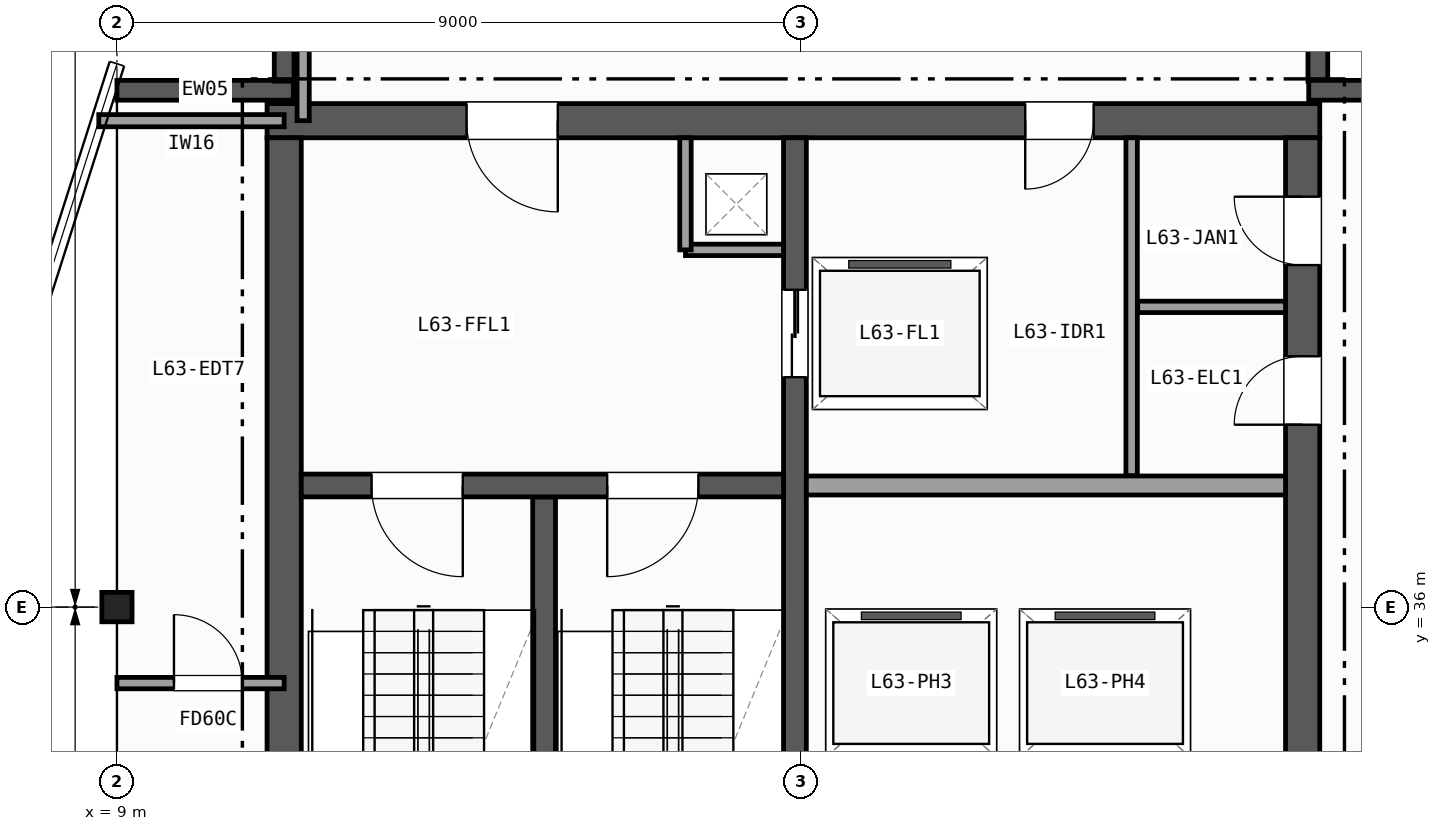
"""IFC4 building model, lengths in metres.
Left out: names, types, materials, properties, quantities, classifications, styles, units other than length and angle.
Written with IfcOpenShell. Run it as: python <this file> out.ifc"""

import sys

from ifc_helpers import new_model, si_unit, direction, frame, frame_2d, origin, origin_2d, place, context, subcontext, project, spatial, rectangle, i_section, extrude, element, fill, save


model = new_model("IFC4")
c1 = context("Model", 3, precision=1e-05, world=origin(), true_north=direction((0.0, 1.0)))
c2 = subcontext(c1, "Body", "Model", "MODEL_VIEW")
j1 = project(units=[si_unit("LENGTHUNIT", "METRE"), si_unit("PLANEANGLEUNIT", "RADIAN")], contexts=[c1])
p1 = place(None, origin())
s1 = spatial("IfcSite", under=j1, at=p1, CompositionType="ELEMENT")
p2 = place(p1, origin())
s2 = spatial("IfcBuilding", under=s1, at=p2, CompositionType="ELEMENT")
p3 = place(p2, frame((0.0, 0.0, 251.9)))
s3 = spatial("IfcBuildingStorey", under=s2, at=p3, CompositionType="ELEMENT", Elevation=251.9)
p4 = place(p3, frame((9.0, 36.0, 0.0), z_axis=(0.0, 0.0, 1.0), x_axis=(1.0, 0.0, 0.0)))
e1 = element("IfcColumn", 1, at=p4, inside=s3, PredefinedType="COLUMN", context=c2, shape_type="SweptSolid", body=[
    extrude(i_section(OverallWidth=0.397, OverallDepth=0.387, WebThickness=0.021, FlangeThickness=0.033, FilletRadius=0.015, at=origin_2d()), origin(), (0.0, 0.0, 1.0), 3.7),
])
p5 = place(p3, frame((9.0, 42.8, 0.0), z_axis=(0.0, 0.0, 1.0), x_axis=(1.0, 0.0, 0.0)))
e2 = element("IfcWall", 2, at=p5, inside=s3, PredefinedType="SOLIDWALL", context=c2, shape_type="SweptSolid", body=[
    extrude(rectangle(XDim=2.32, YDim=0.26, at=frame_2d((1.16, 0.0))), origin(), (0.0, 0.0, 1.0), 3.42),
])
for number, where, z_axis, x_axis in (
    (3, (11.2, 42.92, 0.0), (0.0, 0.0, 1.0), (0.0, 1.0, 0.0)),
    (4, (24.8, 45.0, 0.0), (0.0, 0.0, 1.0), (0.0, -1.0, 0.0)),
):
    element("IfcWall", number, at=place(p3, frame(where, z_axis=z_axis, x_axis=x_axis)), inside=s3, PredefinedType="SOLIDWALL", context=c2, shape_type="SweptSolid", body=[
        extrude(rectangle(XDim=2.08, YDim=0.26, at=frame_2d((1.04, 0.0))), origin(), (0.0, 0.0, 1.0), 3.42),
    ])
p6 = place(p3, frame((24.68, 42.8, 0.0), z_axis=(0.0, 0.0, 1.0), x_axis=(1.0, 0.0, 0.0)))
e5 = element("IfcWall", 5, at=p6, inside=s3, PredefinedType="SOLIDWALL", context=c2, shape_type="SweptSolid", body=[
    extrude(rectangle(XDim=2.32, YDim=0.26, at=frame_2d((1.16, 0.0))), origin(), (0.0, 0.0, 1.0), 3.42),
])
p7 = place(p3, frame((24.825, 42.4, 0.0), z_axis=(0.0, 0.0, 1.0), x_axis=(-1.0, 0.0, 0.0)))
e6 = element("IfcWall", 6, at=p7, inside=s3, PredefinedType="SHEAR", context=c2, shape_type="SweptSolid", body=[
    extrude(rectangle(XDim=13.85, YDim=0.45, at=frame_2d((6.925, 0.0))), origin(), (0.0, 0.0, 1.0), 3.42),
])
p8 = place(p7, frame((10.025, 0.0, 0.0)))
e7 = element("IfcOpeningElement", 7, at=p8, cuts=e6, PredefinedType="OPENING", context=c2, shape_type="SweptSolid", body=[
    extrude(rectangle(XDim=1.2, YDim=2.15, at=frame_2d((0.6, 1.075))), frame((0.0, 0.235, 0.0), z_axis=(0.0, -1.0, 0.0), x_axis=(1.0, 0.0, 0.0)), (0.0, 0.0, 1.0), 0.47),
])
p9 = place(p7, frame((2.975, 0.0, 0.0)))
e8 = element("IfcOpeningElement", 8, at=p9, cuts=e6, PredefinedType="OPENING", context=c2, shape_type="SweptSolid", body=[
    extrude(rectangle(XDim=0.9, YDim=2.1, at=frame_2d((0.45, 1.05))), frame((0.0, 0.235, 0.0), z_axis=(0.0, -1.0, 0.0), x_axis=(1.0, 0.0, 0.0)), (0.0, 0.0, 1.0), 0.47),
])
p10 = place(p3, frame((11.2, 42.175, 0.0), z_axis=(0.0, 0.0, 1.0), x_axis=(0.0, -1.0, 0.0)))
e9 = element("IfcWall", 9, at=p10, inside=s3, PredefinedType="SHEAR", context=c2, shape_type="SweptSolid", body=[
    extrude(rectangle(XDim=13.75, YDim=0.45, at=frame_2d((6.875, 0.0))), origin(), (0.0, 0.0, 1.0), 3.42),
])
p11 = place(p3, frame((24.6, 28.425, 0.0), z_axis=(0.0, 0.0, 1.0), x_axis=(0.0, 1.0, 0.0)))
e10 = element("IfcWall", 10, at=p11, inside=s3, PredefinedType="SHEAR", context=c2, shape_type="SweptSolid", body=[
    extrude(rectangle(XDim=13.75, YDim=0.45, at=frame_2d((6.875, 0.0))), origin(), (0.0, 0.0, 1.0), 3.42),
])
p12 = place(p11, frame((3.375, 0.0, 0.0)))
e11 = element("IfcOpeningElement", 11, at=p12, cuts=e10, PredefinedType="OPENING", context=c2, shape_type="SweptSolid", body=[
    extrude(rectangle(XDim=1.5, YDim=2.2, at=frame_2d((0.75, 1.1))), frame((0.0, 0.235, 0.0), z_axis=(0.0, -1.0, 0.0), x_axis=(1.0, 0.0, 0.0)), (0.0, 0.0, 1.0), 0.47),
])
p13 = place(p11, frame((9.975, 0.0, 0.0)))
e12 = element("IfcOpeningElement", 12, at=p13, cuts=e10, PredefinedType="OPENING", context=c2, shape_type="SweptSolid", body=[
    extrude(rectangle(XDim=0.9, YDim=2.1, at=frame_2d((0.45, 1.05))), frame((0.0, 0.235, 0.0), z_axis=(0.0, -1.0, 0.0), x_axis=(1.0, 0.0, 0.0)), (0.0, 0.0, 1.0), 0.47),
])
p14 = place(p11, frame((12.075, 0.0, 0.0)))
e13 = element("IfcOpeningElement", 13, at=p14, cuts=e10, PredefinedType="OPENING", context=c2, shape_type="SweptSolid", body=[
    extrude(rectangle(XDim=0.9, YDim=2.1, at=frame_2d((0.45, 1.05))), frame((0.0, 0.235, 0.0), z_axis=(0.0, -1.0, 0.0), x_axis=(1.0, 0.0, 0.0)), (0.0, 0.0, 1.0), 0.47),
])
p15 = place(p3, frame((14.62, 28.425, 0.0), z_axis=(0.0, 0.0, 1.0), x_axis=(0.0, 1.0, 0.0)))
e14 = element("IfcWall", 14, at=p15, inside=s3, PredefinedType="SHEAR", context=c2, shape_type="SweptSolid", body=[
    extrude(rectangle(XDim=9.025, YDim=0.3, at=frame_2d((4.512, 0.0))), origin(), (0.0, 0.0, 1.0), 3.42),
])
p16 = place(p3, frame((17.92, 42.175, 0.0), z_axis=(0.0, 0.0, 1.0), x_axis=(0.0, -1.0, 0.0)))
e15 = element("IfcWall", 15, at=p16, inside=s3, PredefinedType="SHEAR", context=c2, shape_type="SweptSolid", body=[
    extrude(rectangle(XDim=13.75, YDim=0.3, at=frame_2d((6.875, 0.0))), origin(), (0.0, 0.0, 1.0), 3.42),
])
p17 = place(p16, frame((2.0, 0.0, 0.0)))
e16 = element("IfcOpeningElement", 16, at=p17, cuts=e15, PredefinedType="OPENING", context=c2, shape_type="SweptSolid", body=[
    extrude(rectangle(XDim=1.15, YDim=2.15, at=frame_2d((0.575, 1.075))), frame((0.0, 0.16, 0.0), z_axis=(0.0, -1.0, 0.0), x_axis=(1.0, 0.0, 0.0)), (0.0, 0.0, 1.0), 0.32),
])
p18 = place(p3, frame((17.77, 37.6, 0.0), z_axis=(0.0, 0.0, 1.0), x_axis=(-1.0, 0.0, 0.0)))
e17 = element("IfcWall", 17, at=p18, inside=s3, PredefinedType="SHEAR", context=c2, shape_type="SweptSolid", body=[
    extrude(rectangle(XDim=6.345, YDim=0.3, at=frame_2d((3.172, 0.0))), origin(), (0.0, 0.0, 1.0), 3.42),
])
p19 = place(p18, frame((4.22, 0.0, 0.0)))
e18 = element("IfcOpeningElement", 18, at=p19, cuts=e17, PredefinedType="OPENING", context=c2, shape_type="SweptSolid", body=[
    extrude(rectangle(XDim=1.2, YDim=2.15, at=frame_2d((0.6, 1.075))), frame((0.0, 0.16, 0.0), z_axis=(0.0, -1.0, 0.0), x_axis=(1.0, 0.0, 0.0)), (0.0, 0.0, 1.0), 0.32),
])
p20 = place(p18, frame((1.12, 0.0, 0.0)))
e19 = element("IfcOpeningElement", 19, at=p20, cuts=e17, PredefinedType="OPENING", context=c2, shape_type="SweptSolid", body=[
    extrude(rectangle(XDim=1.2, YDim=2.15, at=frame_2d((0.6, 1.075))), frame((0.0, 0.16, 0.0), z_axis=(0.0, -1.0, 0.0), x_axis=(1.0, 0.0, 0.0)), (0.0, 0.0, 1.0), 0.32),
])
p21 = place(p3, frame((16.48, 40.7, 0.0), z_axis=(0.0, 0.0, 1.0), x_axis=(1.0, 0.0, 0.0)))
e20 = element("IfcWall", 20, at=p21, inside=s3, PredefinedType="PARTITIONING", context=c2, shape_type="SweptSolid", body=[
    extrude(rectangle(XDim=1.29, YDim=0.15, at=frame_2d((0.645, 0.0))), origin(), (0.0, 0.0, 1.0), 3.42),
])
p22 = place(p3, frame((16.48, 40.7, 0.0), z_axis=(0.0, 0.0, 1.0), x_axis=(0.0, 1.0, 0.0)))
e21 = element("IfcWall", 21, at=p22, inside=s3, PredefinedType="PARTITIONING", context=c2, shape_type="SweptSolid", body=[
    extrude(rectangle(XDim=1.475, YDim=0.15, at=frame_2d((0.738, 0.0))), origin(), (0.0, 0.0, 1.0), 3.42),
])
p23 = place(p3, frame((18.07, 37.6, 0.0), z_axis=(0.0, 0.0, 1.0), x_axis=(1.0, 0.0, 0.0)))
e22 = element("IfcWall", 22, at=p23, inside=s3, PredefinedType="PARTITIONING", context=c2, shape_type="SweptSolid", body=[
    extrude(rectangle(XDim=6.305, YDim=0.25, at=frame_2d((3.152, 0.0))), origin(), (0.0, 0.0, 1.0), 3.42),
])
p24 = place(p3, frame((22.35, 37.73, 0.0), z_axis=(0.0, 0.0, 1.0), x_axis=(0.0, 1.0, 0.0)))
e23 = element("IfcWall", 23, at=p24, inside=s3, PredefinedType="PARTITIONING", context=c2, shape_type="SweptSolid", body=[
    extrude(rectangle(XDim=4.445, YDim=0.15, at=frame_2d((2.223, 0.0))), origin(), (0.0, 0.0, 1.0), 3.42),
])
p25 = place(p3, frame((22.43, 39.95, 0.0), z_axis=(0.0, 0.0, 1.0), x_axis=(1.0, 0.0, 0.0)))
e24 = element("IfcWall", 24, at=p25, inside=s3, PredefinedType="PARTITIONING", context=c2, shape_type="SweptSolid", body=[
    extrude(rectangle(XDim=1.945, YDim=0.15, at=frame_2d((0.973, 0.0))), origin(), (0.0, 0.0, 1.0), 3.42),
])
p26 = place(p3, frame((8.761, 42.4, 0.0), z_axis=(0.0, 0.0, 1.0), x_axis=(1.0, 0.0, 0.0)))
e25 = element("IfcWall", 25, at=p26, inside=s3, PredefinedType="PARTITIONING", context=c2, shape_type="SweptSolid", body=[
    extrude(rectangle(XDim=2.439, YDim=0.16, at=frame_2d((1.219, 0.0))), origin(), (0.0, 0.0, 1.0), 3.42),
])
p27 = place(p3, frame((11.45, 42.4, 0.0), z_axis=(0.0, 0.0, 1.0), x_axis=(0.0, 1.0, 0.0)))
e26 = element("IfcWall", 26, at=p27, inside=s3, PredefinedType="PARTITIONING", context=c2, shape_type="SweptSolid", body=[
    extrude(rectangle(XDim=2.666, YDim=0.16, at=frame_2d((1.333, 0.0))), origin(), (0.0, 0.0, 1.0), 3.42),
])
p28 = place(p3, frame((9.0, 35.0, 0.0), z_axis=(0.0, 0.0, 1.0), x_axis=(1.0, 0.0, 0.0)))
e27 = element("IfcWall", 27, at=p28, inside=s3, PredefinedType="PARTITIONING", context=c2, shape_type="SweptSolid", body=[
    extrude(rectangle(XDim=2.2, YDim=0.15, at=frame_2d((1.1, 0.0))), origin(), (0.0, 0.0, 1.0), 2.707),
])
p29 = place(p28, frame((0.75, 0.0, 0.0)))
e28 = element("IfcOpeningElement", 28, at=p29, cuts=e27, PredefinedType="OPENING", context=c2, shape_type="SweptSolid", body=[
    extrude(rectangle(XDim=0.9, YDim=2.1, at=frame_2d((0.45, 1.05))), frame((0.0, 0.085, 0.0), z_axis=(0.0, -1.0, 0.0), x_axis=(1.0, 0.0, 0.0)), (0.0, 0.0, 1.0), 0.17),
])
p30 = place(p19, origin())
e29 = element("IfcDoor", 29, at=p30, inside=s3, OperationType="SINGLE_SWING_LEFT", PredefinedType="DOOR", context=c2, shape_type="SweptSolid", body=[
    extrude(rectangle(XDim=1.2, YDim=2.15, at=frame_2d((0.6, 1.075))), frame((0.0, 0.025, 0.0), z_axis=(0.0, -1.0, 0.0), x_axis=(1.0, 0.0, 0.0)), (0.0, 0.0, 1.0), 0.05),
])
fill(e18, e29)
p31 = place(p20, origin())
e30 = element("IfcDoor", 30, at=p31, inside=s3, OperationType="SINGLE_SWING_RIGHT", PredefinedType="DOOR", context=c2, shape_type="SweptSolid", body=[
    extrude(rectangle(XDim=1.2, YDim=2.15, at=frame_2d((0.6, 1.075))), frame((0.0, 0.025, 0.0), z_axis=(0.0, -1.0, 0.0), x_axis=(1.0, 0.0, 0.0)), (0.0, 0.0, 1.0), 0.05),
])
fill(e19, e30)
p32 = place(p8, origin())
e31 = element("IfcDoor", 31, at=p32, inside=s3, OperationType="SINGLE_SWING_LEFT", PredefinedType="DOOR", context=c2, shape_type="SweptSolid", body=[
    extrude(rectangle(XDim=1.2, YDim=2.15, at=frame_2d((0.6, 1.075))), frame((0.0, 0.025, 0.0), z_axis=(0.0, -1.0, 0.0), x_axis=(1.0, 0.0, 0.0)), (0.0, 0.0, 1.0), 0.05),
])
fill(e7, e31)
p33 = place(p13, origin())
e32 = element("IfcDoor", 32, at=p33, inside=s3, OperationType="SINGLE_SWING_LEFT", PredefinedType="DOOR", context=c2, shape_type="SweptSolid", body=[
    extrude(rectangle(XDim=0.9, YDim=2.1, at=frame_2d((0.45, 1.05))), frame((0.0, 0.025, 0.0), z_axis=(0.0, -1.0, 0.0), x_axis=(1.0, 0.0, 0.0)), (0.0, 0.0, 1.0), 0.05),
])
fill(e12, e32)
p34 = place(p9, origin())
e33 = element("IfcDoor", 33, at=p34, inside=s3, OperationType="SINGLE_SWING_RIGHT", PredefinedType="DOOR", context=c2, shape_type="SweptSolid", body=[
    extrude(rectangle(XDim=0.9, YDim=2.1, at=frame_2d((0.45, 1.05))), frame((0.0, 0.025, 0.0), z_axis=(0.0, -1.0, 0.0), x_axis=(1.0, 0.0, 0.0)), (0.0, 0.0, 1.0), 0.05),
])
fill(e8, e33)
p35 = place(p14, origin())
e34 = element("IfcDoor", 34, at=p35, inside=s3, OperationType="SINGLE_SWING_RIGHT", PredefinedType="DOOR", context=c2, shape_type="SweptSolid", body=[
    extrude(rectangle(XDim=0.9, YDim=2.1, at=frame_2d((0.45, 1.05))), frame((0.0, 0.025, 0.0), z_axis=(0.0, -1.0, 0.0), x_axis=(1.0, 0.0, 0.0)), (0.0, 0.0, 1.0), 0.05),
])
fill(e13, e34)
p36 = place(p17, origin())
e35 = element("IfcDoor", 35, at=p36, inside=s3, OperationType="DOUBLE_DOOR_SLIDING", PredefinedType="DOOR", context=c2, shape_type="SweptSolid", body=[
    extrude(rectangle(XDim=1.15, YDim=2.15, at=frame_2d((0.575, 1.075))), frame((0.0, 0.025, 0.0), z_axis=(0.0, -1.0, 0.0), x_axis=(1.0, 0.0, 0.0)), (0.0, 0.0, 1.0), 0.05),
])
fill(e16, e35)
p37 = place(p29, origin())
e36 = element("IfcDoor", 36, at=p37, inside=s3, OperationType="SINGLE_SWING_LEFT", PredefinedType="DOOR", context=c2, shape_type="SweptSolid", body=[
    extrude(rectangle(XDim=0.9, YDim=2.1, at=frame_2d((0.45, 1.05))), frame((0.0, 0.025, 0.0), z_axis=(0.0, -1.0, 0.0), x_axis=(1.0, 0.0, 0.0)), (0.0, 0.0, 1.0), 0.05),
])
fill(e28, e36)
save(model, sys.argv[1])
